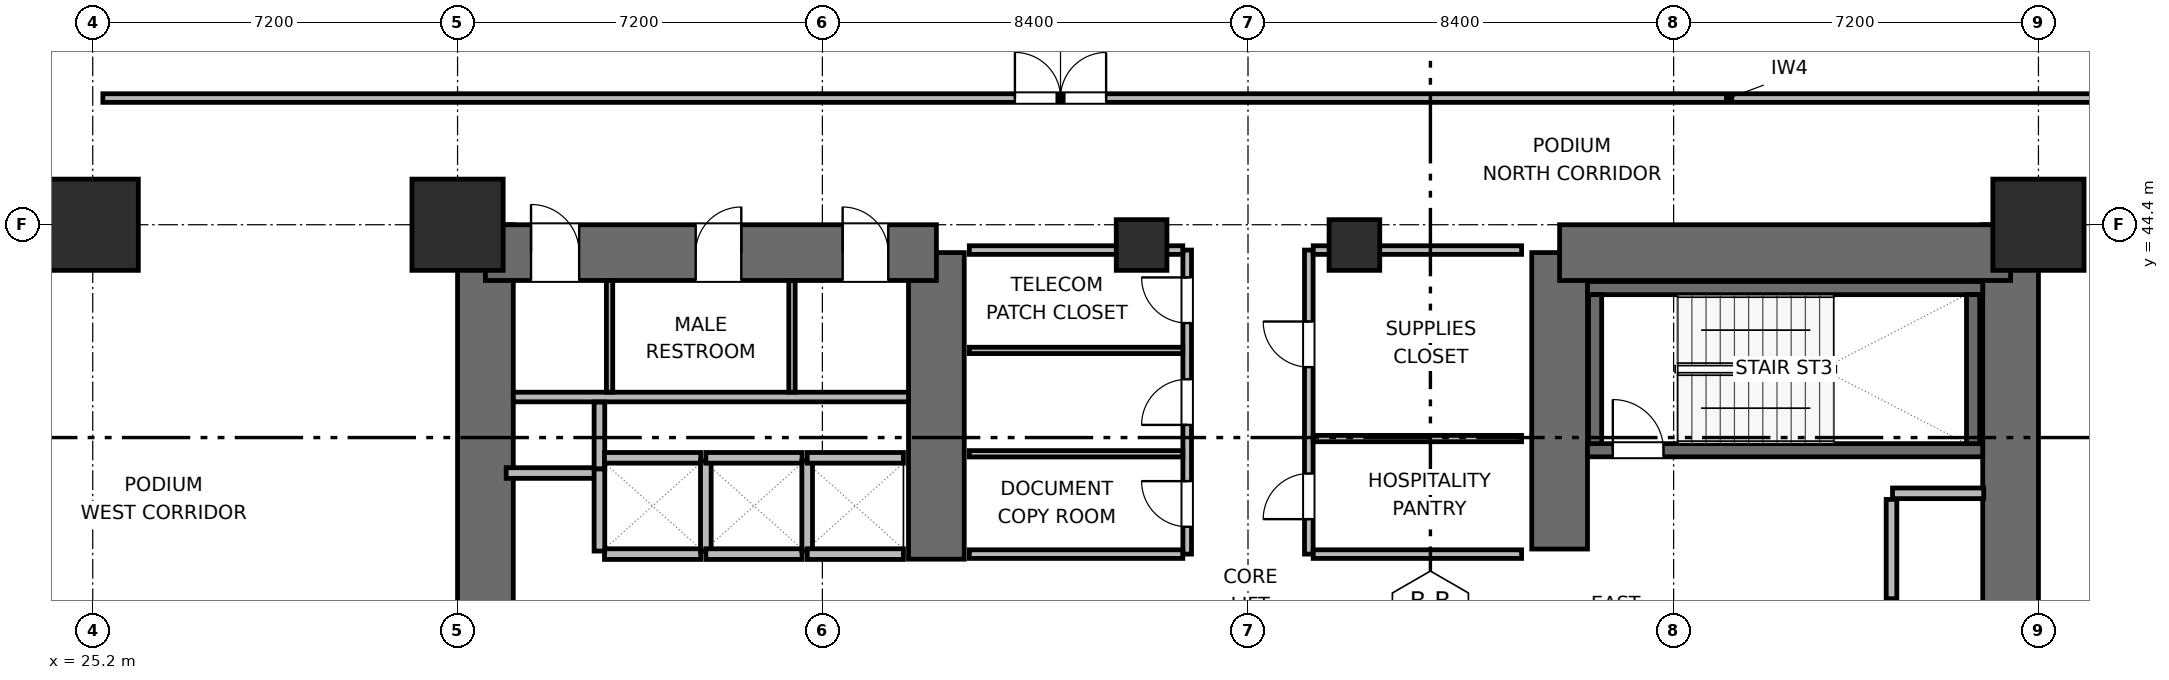
"""IFC4 building model, lengths in metres.
Left out: names, types, materials, properties, quantities, classifications, styles, units other than length and angle.
Written with IfcOpenShell. Run it as: python <this file> out.ifc"""

import sys

from ifc_helpers import new_model, si_unit, direction, frame, frame_2d, origin, origin_2d, place, context, subcontext, project, spatial, rectangle, extrude, element, fill, save


model = new_model("IFC4")
c1 = context("Model", 3, precision=1e-05, world=origin(), true_north=direction((0.0, 1.0)))
c2 = subcontext(c1, "Body", "Model", "MODEL_VIEW")
j1 = project(units=[si_unit("LENGTHUNIT", "METRE"), si_unit("PLANEANGLEUNIT", "RADIAN")], contexts=[c1])
p1 = place(None, origin())
s1 = spatial("IfcSite", under=j1, at=p1, CompositionType="ELEMENT")
p2 = place(p1, origin())
s2 = spatial("IfcBuilding", under=s1, at=p2, CompositionType="ELEMENT")
p3 = place(p2, frame((0.0, 0.0, 12.9)))
s3 = spatial("IfcBuildingStorey", under=s2, at=p3, CompositionType="ELEMENT", Elevation=12.9)
p4 = place(p3, frame((32.95, 27.6, 0.0), z_axis=(0.0, 0.0, 1.0), x_axis=(0.0, 1.0, 0.0)))
e1 = element("IfcWall", 1, at=p4, inside=s3, PredefinedType="SHEAR", context=c2, shape_type="SweptSolid", body=[
    extrude(rectangle(XDim=16.8, YDim=1.1, at=frame_2d((8.4, 0.0))), origin(), (0.0, 0.0, 1.0), 4.2),
])
p5 = place(p3, frame((41.85, 37.8, 0.0), z_axis=(0.0, 0.0, 1.0), x_axis=(0.0, 1.0, 0.0)))
e2 = element("IfcWall", 2, at=p5, inside=s3, PredefinedType="SHEAR", context=c2, shape_type="SweptSolid", body=[
    extrude(rectangle(XDim=6.05, YDim=1.1, at=frame_2d((3.025, 0.0))), origin(), (0.0, 0.0, 1.0), 4.2),
])
p6 = place(p3, frame((32.95, 43.85, 0.0), z_axis=(0.0, 0.0, 1.0), x_axis=(1.0, 0.0, 0.0)))
e3 = element("IfcWall", 3, at=p6, inside=s3, PredefinedType="SHEAR", context=c2, shape_type="SweptSolid", body=[
    extrude(rectangle(XDim=8.9, YDim=1.1, at=frame_2d((4.45, 0.0))), origin(), (0.0, 0.0, 1.0), 4.2),
])
p7 = place(p6, frame((0.9, 0.0, 0.0)))
e4 = element("IfcOpeningElement", 4, at=p7, cuts=e3, PredefinedType="OPENING", context=c2, shape_type="SweptSolid", body=[
    extrude(rectangle(XDim=0.95, YDim=2.04, at=frame_2d((0.475, 1.02))), frame((0.0, 0.56, 0.0), z_axis=(0.0, -1.0, 0.0), x_axis=(1.0, 0.0, 0.0)), (0.0, 0.0, 1.0), 1.12),
])
p8 = place(p6, frame((4.15, 0.0, 0.0)))
e5 = element("IfcOpeningElement", 5, at=p8, cuts=e3, PredefinedType="OPENING", context=c2, shape_type="SweptSolid", body=[
    extrude(rectangle(XDim=0.9, YDim=2.02, at=frame_2d((0.45, 1.01))), frame((0.0, 0.56, 0.0), z_axis=(0.0, -1.0, 0.0), x_axis=(1.0, 0.0, 0.0)), (0.0, 0.0, 1.0), 1.12),
])
p9 = place(p6, frame((7.05, 0.0, 0.0)))
e6 = element("IfcOpeningElement", 6, at=p9, cuts=e3, PredefinedType="OPENING", context=c2, shape_type="SweptSolid", body=[
    extrude(rectangle(XDim=0.9, YDim=2.02, at=frame_2d((0.45, 1.01))), frame((0.0, 0.56, 0.0), z_axis=(0.0, -1.0, 0.0), x_axis=(1.0, 0.0, 0.0)), (0.0, 0.0, 1.0), 1.12),
])
p10 = place(p3, frame((54.15, 38.0, 0.0), z_axis=(0.0, 0.0, 1.0), x_axis=(0.0, 1.0, 0.0)))
e7 = element("IfcWall", 7, at=p10, inside=s3, PredefinedType="SHEAR", context=c2, shape_type="SweptSolid", body=[
    extrude(rectangle(XDim=5.85, YDim=1.1, at=frame_2d((2.925, 0.0))), origin(), (0.0, 0.0, 1.0), 4.2),
])
p11 = place(p3, frame((63.05, 27.6, 0.0), z_axis=(0.0, 0.0, 1.0), x_axis=(0.0, 1.0, 0.0)))
e8 = element("IfcWall", 8, at=p11, inside=s3, PredefinedType="SHEAR", context=c2, shape_type="SweptSolid", body=[
    extrude(rectangle(XDim=16.8, YDim=1.1, at=frame_2d((8.4, 0.0))), origin(), (0.0, 0.0, 1.0), 4.2),
])
p12 = place(p3, frame((54.15, 43.85, 0.0), z_axis=(0.0, 0.0, 1.0), x_axis=(1.0, 0.0, 0.0)))
e9 = element("IfcWall", 9, at=p12, inside=s3, PredefinedType="SHEAR", context=c2, shape_type="SweptSolid", body=[
    extrude(rectangle(XDim=8.9, YDim=1.1, at=frame_2d((4.45, 0.0))), origin(), (0.0, 0.0, 1.0), 4.2),
])
p13 = place(p3, frame((54.7, 39.95, 0.0), z_axis=(0.0, 0.0, 1.0), x_axis=(1.0, 0.0, 0.0)))
e10 = element("IfcWall", 10, at=p13, inside=s3, PredefinedType="SHEAR", context=c2, shape_type="SweptSolid", body=[
    extrude(rectangle(XDim=7.8, YDim=0.26, at=frame_2d((3.9, 0.0))), origin(), (0.0, 0.0, 1.0), 4.2),
])
p14 = place(p13, frame((0.5, 0.0, 0.0)))
e11 = element("IfcOpeningElement", 11, at=p14, cuts=e10, PredefinedType="OPENING", context=c2, shape_type="SweptSolid", body=[
    extrude(rectangle(XDim=1.0, YDim=2.04, at=frame_2d((0.5, 1.02))), frame((0.0, 0.14, 0.0), z_axis=(0.0, -1.0, 0.0), x_axis=(1.0, 0.0, 0.0)), (0.0, 0.0, 1.0), 0.28),
])
p15 = place(p3, frame((54.7, 43.15, 0.0), z_axis=(0.0, 0.0, 1.0), x_axis=(1.0, 0.0, 0.0)))
e12 = element("IfcWall", 12, at=p15, inside=s3, PredefinedType="SHEAR", context=c2, shape_type="SweptSolid", body=[
    extrude(rectangle(XDim=7.8, YDim=0.26, at=frame_2d((3.9, 0.0))), origin(), (0.0, 0.0, 1.0), 4.2),
])
for number, where, z_axis, x_axis in (
    (13, (54.85, 40.08, 0.0), (0.0, 0.0, 1.0), (0.0, 1.0, 0.0)),
    (14, (62.31, 40.08, 0.0), (0.0, 0.0, 1.0), (0.0, 1.0, 0.0)),
):
    element("IfcWall", number, at=place(p3, frame(where, z_axis=z_axis, x_axis=x_axis)), inside=s3, PredefinedType="SHEAR", context=c2, shape_type="SweptSolid", body=[
        extrude(rectangle(XDim=2.94, YDim=0.26, at=frame_2d((1.47, 0.0))), origin(), (0.0, 0.0, 1.0), 4.2),
    ])
for number, where, z_axis, x_axis in (
    (15, (25.2, 44.4, 0.0), (0.0, 0.0, 1.0), (1.0, 0.0, 0.0)),
    (16, (32.4, 44.4, 0.0), (0.0, 0.0, 1.0), (1.0, 0.0, 0.0)),
    (17, (63.6, 44.4, 0.0), (0.0, 0.0, 1.0), (1.0, 0.0, 0.0)),
):
    element("IfcColumn", number, at=place(p3, frame(where, z_axis=z_axis, x_axis=x_axis)), inside=s3, PredefinedType="COLUMN", context=c2, shape_type="SweptSolid", body=[
        extrude(rectangle(XDim=1.8, YDim=1.8, at=origin_2d()), origin(), (0.0, 0.0, 1.0), 4.2),
    ])
for number, where, z_axis, x_axis in (
    (18, (45.9, 44.0, 0.0), (0.0, 0.0, 1.0), (1.0, 0.0, 0.0)),
    (19, (50.1, 44.0, 0.0), (0.0, 0.0, 1.0), (1.0, 0.0, 0.0)),
):
    element("IfcColumn", number, at=place(p3, frame(where, z_axis=z_axis, x_axis=x_axis)), inside=s3, PredefinedType="COLUMN", context=c2, shape_type="SweptSolid", body=[
        extrude(rectangle(XDim=1.0, YDim=1.0, at=origin_2d()), origin(), (0.0, 0.0, 1.0), 4.2),
    ])
p16 = place(p3, frame((33.5, 41.0, 0.0), z_axis=(0.0, 0.0, 1.0), x_axis=(1.0, 0.0, 0.0)))
e20 = element("IfcWall", 20, at=p16, inside=s3, PredefinedType="PLUMBINGWALL", context=c2, shape_type="SweptSolid", body=[
    extrude(rectangle(XDim=7.8, YDim=0.19, at=frame_2d((3.9, 0.0))), origin(), (0.0, 0.0, 1.0), 3.84),
])
for number, where, z_axis, x_axis in (
    (21, (35.4, 41.095, 0.0), (0.0, 0.0, 1.0), (0.0, 1.0, 0.0)),
    (22, (39.0, 41.095, 0.0), (0.0, 0.0, 1.0), (0.0, 1.0, 0.0)),
):
    element("IfcWall", number, at=place(p3, frame(where, z_axis=z_axis, x_axis=x_axis)), inside=s3, PredefinedType="PARTITIONING", context=c2, shape_type="SweptSolid", body=[
        extrude(rectangle(XDim=2.205, YDim=0.125, at=frame_2d((1.103, 0.0))), origin(), (0.0, 0.0, 1.0), 3.84),
    ])
p17 = place(p3, frame((33.36, 39.5, 0.0), z_axis=(0.0, 0.0, 1.0), x_axis=(1.0, 0.0, 0.0)))
e23 = element("IfcWall", 23, at=p17, inside=s3, PredefinedType="PARTITIONING", context=c2, shape_type="SweptSolid", body=[
    extrude(rectangle(XDim=1.86, YDim=0.21, at=frame_2d((0.93, 0.0))), origin(), (0.0, 0.0, 1.0), 3.84),
])
p18 = place(p3, frame((35.2, 39.58, 0.0), z_axis=(0.0, 0.0, 1.0), x_axis=(0.0, 1.0, 0.0)))
e24 = element("IfcWall", 24, at=p18, inside=s3, PredefinedType="PARTITIONING", context=c2, shape_type="SweptSolid", body=[
    extrude(rectangle(XDim=1.32, YDim=0.21, at=frame_2d((0.66, 0.0))), origin(), (0.0, 0.0, 1.0), 3.84),
])
p19 = place(p3, frame((60.72, 39.1, 0.0), z_axis=(0.0, 0.0, 1.0), x_axis=(1.0, 0.0, 0.0)))
e25 = element("IfcWall", 25, at=p19, inside=s3, PredefinedType="PARTITIONING", context=c2, shape_type="SweptSolid", body=[
    extrude(rectangle(XDim=1.8, YDim=0.21, at=frame_2d((0.9, 0.0))), origin(), (0.0, 0.0, 1.0), 3.84),
])
p20 = place(p3, frame((60.7, 37.02, 0.0), z_axis=(0.0, 0.0, 1.0), x_axis=(0.0, 1.0, 0.0)))
e26 = element("IfcWall", 26, at=p20, inside=s3, PredefinedType="PARTITIONING", context=c2, shape_type="SweptSolid", body=[
    extrude(rectangle(XDim=1.96, YDim=0.21, at=frame_2d((0.98, 0.0))), origin(), (0.0, 0.0, 1.0), 3.84),
])
for number, where, z_axis, x_axis in (
    (27, (35.3, 37.9, 0.0), (0.0, 0.0, 1.0), (1.0, 0.0, 0.0)),
    (28, (35.3, 39.8, 0.0), (0.0, 0.0, 1.0), (1.0, 0.0, 0.0)),
):
    element("IfcWall", number, at=place(p3, frame(where, z_axis=z_axis, x_axis=x_axis)), inside=s3, PredefinedType="PARTITIONING", context=c2, shape_type="SweptSolid", body=[
        extrude(rectangle(XDim=1.9, YDim=0.21, at=frame_2d((0.95, 0.0))), origin(), (0.0, 0.0, 1.0), 3.84),
    ])
p21 = place(p3, frame((35.2, 37.96, 0.0), z_axis=(0.0, 0.0, 1.0), x_axis=(0.0, 1.0, 0.0)))
e29 = element("IfcWall", 29, at=p21, inside=s3, PredefinedType="PARTITIONING", context=c2, shape_type="SweptSolid", body=[
    extrude(rectangle(XDim=1.62, YDim=0.21, at=frame_2d((0.81, 0.0))), origin(), (0.0, 0.0, 1.0), 3.84),
])
p22 = place(p3, frame((37.3, 37.96, 0.0), z_axis=(0.0, 0.0, 1.0), x_axis=(0.0, 1.0, 0.0)))
e30 = element("IfcWall", 30, at=p22, inside=s3, PredefinedType="PARTITIONING", context=c2, shape_type="SweptSolid", body=[
    extrude(rectangle(XDim=1.78, YDim=0.21, at=frame_2d((0.89, 0.0))), origin(), (0.0, 0.0, 1.0), 3.84),
])
for number, where, z_axis, x_axis in (
    (31, (37.3, 37.9, 0.0), (0.0, 0.0, 1.0), (1.0, 0.0, 0.0)),
    (32, (37.3, 39.8, 0.0), (0.0, 0.0, 1.0), (1.0, 0.0, 0.0)),
):
    element("IfcWall", number, at=place(p3, frame(where, z_axis=z_axis, x_axis=x_axis)), inside=s3, PredefinedType="PARTITIONING", context=c2, shape_type="SweptSolid", body=[
        extrude(rectangle(XDim=1.9, YDim=0.21, at=frame_2d((0.95, 0.0))), origin(), (0.0, 0.0, 1.0), 3.84),
    ])
p23 = place(p3, frame((39.3, 37.96, 0.0), z_axis=(0.0, 0.0, 1.0), x_axis=(0.0, 1.0, 0.0)))
e33 = element("IfcWall", 33, at=p23, inside=s3, PredefinedType="PARTITIONING", context=c2, shape_type="SweptSolid", body=[
    extrude(rectangle(XDim=1.78, YDim=0.21, at=frame_2d((0.89, 0.0))), origin(), (0.0, 0.0, 1.0), 3.84),
])
for number, where, z_axis, x_axis in (
    (34, (39.3, 37.9, 0.0), (0.0, 0.0, 1.0), (1.0, 0.0, 0.0)),
    (35, (39.3, 39.8, 0.0), (0.0, 0.0, 1.0), (1.0, 0.0, 0.0)),
):
    element("IfcWall", number, at=place(p3, frame(where, z_axis=z_axis, x_axis=x_axis)), inside=s3, PredefinedType="PARTITIONING", context=c2, shape_type="SweptSolid", body=[
        extrude(rectangle(XDim=1.9, YDim=0.21, at=frame_2d((0.95, 0.0))), origin(), (0.0, 0.0, 1.0), 3.84),
    ])
p24 = place(p3, frame((46.8, 37.9, 0.0), z_axis=(0.0, 0.0, 1.0), x_axis=(0.0, 1.0, 0.0)))
e36 = element("IfcWall", 36, at=p24, inside=s3, PredefinedType="PARTITIONING", context=c2, shape_type="SweptSolid", body=[
    extrude(rectangle(XDim=6.0, YDim=0.17, at=frame_2d((3.0, 0.0))), origin(), (0.0, 0.0, 1.0), 3.84),
])
p25 = place(p24, frame((0.54, 0.0, 0.0)))
e37 = element("IfcOpeningElement", 37, at=p25, cuts=e36, PredefinedType="OPENING", context=c2, shape_type="SweptSolid", body=[
    extrude(rectangle(XDim=0.9, YDim=2.02, at=frame_2d((0.45, 1.01))), frame((0.0, 0.095, 0.0), z_axis=(0.0, -1.0, 0.0), x_axis=(1.0, 0.0, 0.0)), (0.0, 0.0, 1.0), 0.19),
])
p26 = place(p24, frame((2.55, 0.0, 0.0)))
e38 = element("IfcOpeningElement", 38, at=p26, cuts=e36, PredefinedType="OPENING", context=c2, shape_type="SweptSolid", body=[
    extrude(rectangle(XDim=0.9, YDim=2.02, at=frame_2d((0.45, 1.01))), frame((0.0, 0.095, 0.0), z_axis=(0.0, -1.0, 0.0), x_axis=(1.0, 0.0, 0.0)), (0.0, 0.0, 1.0), 0.19),
])
p27 = place(p24, frame((4.56, 0.0, 0.0)))
e39 = element("IfcOpeningElement", 39, at=p27, cuts=e36, PredefinedType="OPENING", context=c2, shape_type="SweptSolid", body=[
    extrude(rectangle(XDim=0.9, YDim=2.02, at=frame_2d((0.45, 1.01))), frame((0.0, 0.095, 0.0), z_axis=(0.0, -1.0, 0.0), x_axis=(1.0, 0.0, 0.0)), (0.0, 0.0, 1.0), 0.19),
])
p28 = place(p3, frame((42.5, 37.9, 0.0), z_axis=(0.0, 0.0, 1.0), x_axis=(1.0, 0.0, 0.0)))
e40 = element("IfcWall", 40, at=p28, inside=s3, PredefinedType="PARTITIONING", context=c2, shape_type="SweptSolid", body=[
    extrude(rectangle(XDim=4.213, YDim=0.17, at=frame_2d((2.106, 0.0))), origin(), (0.0, 0.0, 1.0), 3.84),
])
p29 = place(p3, frame((42.5, 43.9, 0.0), z_axis=(0.0, 0.0, 1.0), x_axis=(1.0, 0.0, 0.0)))
e41 = element("IfcWall", 41, at=p29, inside=s3, PredefinedType="PARTITIONING", context=c2, shape_type="SweptSolid", body=[
    extrude(rectangle(XDim=4.213, YDim=0.17, at=frame_2d((2.106, 0.0))), origin(), (0.0, 0.0, 1.0), 2.725),
])
for number, where, z_axis, x_axis in (
    (42, (42.5, 39.88, 0.0), (0.0, 0.0, 1.0), (1.0, 0.0, 0.0)),
    (43, (42.5, 41.92, 0.0), (0.0, 0.0, 1.0), (1.0, 0.0, 0.0)),
):
    element("IfcWall", number, at=place(p3, frame(where, z_axis=z_axis, x_axis=x_axis)), inside=s3, PredefinedType="PARTITIONING", context=c2, shape_type="SweptSolid", body=[
        extrude(rectangle(XDim=4.213, YDim=0.125, at=frame_2d((2.106, 0.0))), origin(), (0.0, 0.0, 1.0), 3.84),
    ])
p30 = place(p3, frame((49.2, 37.9, 0.0), z_axis=(0.0, 0.0, 1.0), x_axis=(0.0, 1.0, 0.0)))
e44 = element("IfcWall", 44, at=p30, inside=s3, PredefinedType="PARTITIONING", context=c2, shape_type="SweptSolid", body=[
    extrude(rectangle(XDim=6.0, YDim=0.17, at=frame_2d((3.0, 0.0))), origin(), (0.0, 0.0, 1.0), 3.84),
])
p31 = place(p30, frame((0.69, 0.0, 0.0)))
e45 = element("IfcOpeningElement", 45, at=p31, cuts=e44, PredefinedType="OPENING", context=c2, shape_type="SweptSolid", body=[
    extrude(rectangle(XDim=0.9, YDim=2.02, at=frame_2d((0.45, 1.01))), frame((0.0, 0.095, 0.0), z_axis=(0.0, -1.0, 0.0), x_axis=(1.0, 0.0, 0.0)), (0.0, 0.0, 1.0), 0.19),
])
p32 = place(p30, frame((3.69, 0.0, 0.0)))
e46 = element("IfcOpeningElement", 46, at=p32, cuts=e44, PredefinedType="OPENING", context=c2, shape_type="SweptSolid", body=[
    extrude(rectangle(XDim=0.9, YDim=2.02, at=frame_2d((0.45, 1.01))), frame((0.0, 0.095, 0.0), z_axis=(0.0, -1.0, 0.0), x_axis=(1.0, 0.0, 0.0)), (0.0, 0.0, 1.0), 0.19),
])
p33 = place(p3, frame((49.287, 37.9, 0.0), z_axis=(0.0, 0.0, 1.0), x_axis=(1.0, 0.0, 0.0)))
e47 = element("IfcWall", 47, at=p33, inside=s3, PredefinedType="PARTITIONING", context=c2, shape_type="SweptSolid", body=[
    extrude(rectangle(XDim=4.113, YDim=0.17, at=frame_2d((2.056, 0.0))), origin(), (0.0, 0.0, 1.0), 3.84),
])
p34 = place(p3, frame((49.287, 43.9, 0.0), z_axis=(0.0, 0.0, 1.0), x_axis=(1.0, 0.0, 0.0)))
e48 = element("IfcWall", 48, at=p34, inside=s3, PredefinedType="PARTITIONING", context=c2, shape_type="SweptSolid", body=[
    extrude(rectangle(XDim=4.113, YDim=0.17, at=frame_2d((2.056, 0.0))), origin(), (0.0, 0.0, 1.0), 2.725),
])
p35 = place(p3, frame((49.287, 40.18, 0.0), z_axis=(0.0, 0.0, 1.0), x_axis=(1.0, 0.0, 0.0)))
e49 = element("IfcWall", 49, at=p35, inside=s3, PredefinedType="PARTITIONING", context=c2, shape_type="SweptSolid", body=[
    extrude(rectangle(XDim=4.113, YDim=0.125, at=frame_2d((2.056, 0.0))), origin(), (0.0, 0.0, 1.0), 3.84),
])
p36 = place(p3, frame((25.4, 46.9, 0.0), z_axis=(0.0, 0.0, 1.0), x_axis=(1.0, 0.0, 0.0)))
e50 = element("IfcWall", 50, at=p36, inside=s3, PredefinedType="PARTITIONING", context=c2, shape_type="SweptSolid", body=[
    extrude(rectangle(XDim=43.4, YDim=0.17, at=frame_2d((21.7, 0.0))), origin(), (0.0, 0.0, 1.0), 3.84),
])
p37 = place(p36, frame((18.0, 0.0, 0.0)))
e51 = element("IfcOpeningElement", 51, at=p37, cuts=e50, PredefinedType="OPENING", context=c2, shape_type="SweptSolid", body=[
    extrude(rectangle(XDim=1.8, YDim=2.06, at=frame_2d((0.9, 1.03))), frame((0.0, 0.095, 0.0), z_axis=(0.0, -1.0, 0.0), x_axis=(1.0, 0.0, 0.0)), (0.0, 0.0, 1.0), 0.19),
])
p38 = place(p14, origin())
e52 = element("IfcDoor", 52, at=p38, inside=s3, OperationType="SINGLE_SWING_LEFT", PredefinedType="DOOR", context=c2, shape_type="SweptSolid", body=[
    extrude(rectangle(XDim=1.0, YDim=2.04, at=frame_2d((0.5, 1.02))), frame((0.0, 0.025, 0.0), z_axis=(0.0, -1.0, 0.0), x_axis=(1.0, 0.0, 0.0)), (0.0, 0.0, 1.0), 0.05),
])
fill(e11, e52)
p39 = place(p7, origin())
e53 = element("IfcDoor", 53, at=p39, inside=s3, OperationType="SINGLE_SWING_LEFT", PredefinedType="DOOR", context=c2, shape_type="SweptSolid", body=[
    extrude(rectangle(XDim=0.95, YDim=2.04, at=frame_2d((0.475, 1.02))), frame((0.0, 0.025, 0.0), z_axis=(0.0, -1.0, 0.0), x_axis=(1.0, 0.0, 0.0)), (0.0, 0.0, 1.0), 0.05),
])
fill(e4, e53)
p40 = place(p8, origin())
e54 = element("IfcDoor", 54, at=p40, inside=s3, OperationType="SINGLE_SWING_RIGHT", PredefinedType="DOOR", context=c2, shape_type="SweptSolid", body=[
    extrude(rectangle(XDim=0.9, YDim=2.02, at=frame_2d((0.45, 1.01))), frame((0.0, 0.025, 0.0), z_axis=(0.0, -1.0, 0.0), x_axis=(1.0, 0.0, 0.0)), (0.0, 0.0, 1.0), 0.05),
])
fill(e5, e54)
p41 = place(p9, origin())
e55 = element("IfcDoor", 55, at=p41, inside=s3, OperationType="SINGLE_SWING_LEFT", PredefinedType="DOOR", context=c2, shape_type="SweptSolid", body=[
    extrude(rectangle(XDim=0.9, YDim=2.02, at=frame_2d((0.45, 1.01))), frame((0.0, 0.025, 0.0), z_axis=(0.0, -1.0, 0.0), x_axis=(1.0, 0.0, 0.0)), (0.0, 0.0, 1.0), 0.05),
])
fill(e6, e55)
p42 = place(p25, origin())
e56 = element("IfcDoor", 56, at=p42, inside=s3, OperationType="SINGLE_SWING_RIGHT", PredefinedType="DOOR", context=c2, shape_type="SweptSolid", body=[
    extrude(rectangle(XDim=0.9, YDim=2.02, at=frame_2d((0.45, 1.01))), frame((0.0, 0.025, 0.0), z_axis=(0.0, -1.0, 0.0), x_axis=(1.0, 0.0, 0.0)), (0.0, 0.0, 1.0), 0.05),
])
fill(e37, e56)
p43 = place(p26, origin())
e57 = element("IfcDoor", 57, at=p43, inside=s3, OperationType="SINGLE_SWING_LEFT", PredefinedType="DOOR", context=c2, shape_type="SweptSolid", body=[
    extrude(rectangle(XDim=0.9, YDim=2.02, at=frame_2d((0.45, 1.01))), frame((0.0, 0.025, 0.0), z_axis=(0.0, -1.0, 0.0), x_axis=(1.0, 0.0, 0.0)), (0.0, 0.0, 1.0), 0.05),
])
fill(e38, e57)
p44 = place(p27, origin())
e58 = element("IfcDoor", 58, at=p44, inside=s3, OperationType="SINGLE_SWING_RIGHT", PredefinedType="DOOR", context=c2, shape_type="SweptSolid", body=[
    extrude(rectangle(XDim=0.9, YDim=2.02, at=frame_2d((0.45, 1.01))), frame((0.0, 0.025, 0.0), z_axis=(0.0, -1.0, 0.0), x_axis=(1.0, 0.0, 0.0)), (0.0, 0.0, 1.0), 0.05),
])
fill(e39, e58)
p45 = place(p31, origin())
e59 = element("IfcDoor", 59, at=p45, inside=s3, OperationType="SINGLE_SWING_LEFT", PredefinedType="DOOR", context=c2, shape_type="SweptSolid", body=[
    extrude(rectangle(XDim=0.9, YDim=2.02, at=frame_2d((0.45, 1.01))), frame((0.0, 0.025, 0.0), z_axis=(0.0, -1.0, 0.0), x_axis=(1.0, 0.0, 0.0)), (0.0, 0.0, 1.0), 0.05),
])
fill(e45, e59)
p46 = place(p32, origin())
e60 = element("IfcDoor", 60, at=p46, inside=s3, OperationType="SINGLE_SWING_RIGHT", PredefinedType="DOOR", context=c2, shape_type="SweptSolid", body=[
    extrude(rectangle(XDim=0.9, YDim=2.02, at=frame_2d((0.45, 1.01))), frame((0.0, 0.025, 0.0), z_axis=(0.0, -1.0, 0.0), x_axis=(1.0, 0.0, 0.0)), (0.0, 0.0, 1.0), 0.05),
])
fill(e46, e60)
p47 = place(p37, origin())
e61 = element("IfcDoor", 61, at=p47, inside=s3, OperationType="DOUBLE_DOOR_SINGLE_SWING", PredefinedType="DOOR", context=c2, shape_type="SweptSolid", body=[
    extrude(rectangle(XDim=1.8, YDim=2.06, at=frame_2d((0.9, 1.03))), frame((0.0, 0.025, 0.0), z_axis=(0.0, -1.0, 0.0), x_axis=(1.0, 0.0, 0.0)), (0.0, 0.0, 1.0), 0.05),
])
fill(e51, e61)
save(model, sys.argv[1])
